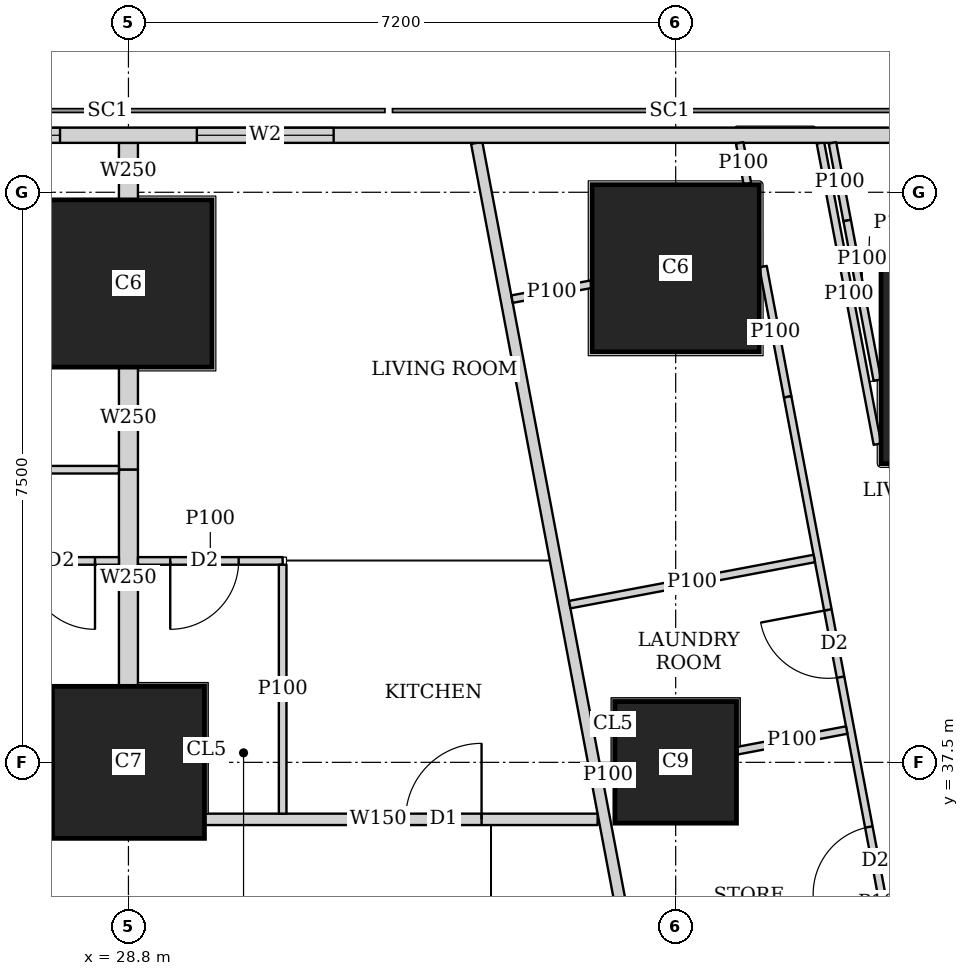
"""IFC4 building model, lengths in metres.
Left out: names, types, materials, properties, quantities, classifications, styles, units other than length and angle.
Written with IfcOpenShell. Run it as: python <this file> out.ifc"""

import sys

from ifc_helpers import new_model, si_unit, direction, frame, frame_2d, origin, origin_2d, place, context, subcontext, project, spatial, rectangle, extrude, element, fill, save


model = new_model("IFC4")
c1 = context("Model", 3, precision=1e-05, world=origin(), true_north=direction((0.0, 1.0)))
c2 = subcontext(c1, "Body", "Model", "MODEL_VIEW")
j1 = project(units=[si_unit("LENGTHUNIT", "METRE"), si_unit("PLANEANGLEUNIT", "RADIAN")], contexts=[c1])
p1 = place(None, origin())
s1 = spatial("IfcSite", under=j1, at=p1, CompositionType="ELEMENT")
p2 = place(p1, origin())
s2 = spatial("IfcBuilding", under=s1, at=p2, CompositionType="ELEMENT")
p3 = place(p2, frame((0.0, 0.0, 77.9)))
s3 = spatial("IfcBuildingStorey", under=s2, at=p3, CompositionType="ELEMENT", Elevation=77.9)
p4 = place(p3, frame((28.8, 37.5, 0.0), z_axis=(0.0, 0.0, 1.0), x_axis=(1.0, 0.0, 0.0)))
e1 = element("IfcColumn", 1, at=p4, inside=s3, PredefinedType="COLUMN", context=c2, shape_type="SweptSolid", body=[
    extrude(rectangle(XDim=2.0, YDim=2.0, at=origin_2d()), origin(), (0.0, 0.0, 1.0), 3.75),
])
p5 = place(p3, frame((36.0, 37.5, 0.0), z_axis=(0.0, 0.0, 1.0), x_axis=(1.0, 0.0, 0.0)))
e2 = element("IfcColumn", 2, at=p5, inside=s3, PredefinedType="COLUMN", context=c2, shape_type="SweptSolid", body=[
    extrude(rectangle(XDim=1.6, YDim=1.6, at=origin_2d()), origin(), (0.0, 0.0, 1.0), 3.75),
])
p6 = place(p3, frame((40.102, 42.83, 0.0), z_axis=(0.0, 0.0, 1.0), x_axis=(1.0, 0.0, 0.0)))
e3 = element("IfcColumn", 3, at=p6, inside=s3, PredefinedType="COLUMN", context=c2, shape_type="SweptSolid", body=[
    extrude(rectangle(XDim=2.8, YDim=2.8, at=origin_2d()), origin(), (0.0, 0.0, 1.0), 3.75),
])
for number, where, z_axis, x_axis in (
    (4, (28.8, 43.8, 0.0), (0.0, 0.0, 1.0), (1.0, 0.0, 0.0)),
    (5, (36.0, 44.0, 0.0), (0.0, 0.0, 1.0), (1.0, 0.0, 0.0)),
):
    element("IfcColumn", number, at=place(p3, frame(where, z_axis=z_axis, x_axis=x_axis)), inside=s3, PredefinedType="COLUMN", context=c2, shape_type="SweptSolid", body=[
        extrude(rectangle(XDim=2.2, YDim=2.2, at=origin_2d()), origin(), (0.0, 0.0, 1.0), 3.75),
    ])
p7 = place(p3, frame((40.106, 45.75, 0.0), z_axis=(0.0, 0.0, 1.0), x_axis=(-1.0, 0.0, 0.0)))
e6 = element("IfcWall", 6, at=p7, inside=s3, PredefinedType="SOLIDWALL", context=c2, shape_type="SweptSolid", body=[
    extrude(rectangle(XDim=37.943, YDim=0.2, at=frame_2d((18.971, 0.0))), origin(), (0.0, 0.0, 1.0), 3.5),
])
p8 = place(p7, frame((8.606, 0.0, 0.9)))
e7 = element("IfcOpeningElement", 7, at=p8, cuts=e6, PredefinedType="OPENING", context=c2, shape_type="SweptSolid", body=[
    extrude(rectangle(XDim=1.8, YDim=1.5, at=frame_2d((0.9, 0.75))), frame((0.0, 0.11, 0.0), z_axis=(0.0, -1.0, 0.0), x_axis=(1.0, 0.0, 0.0)), (0.0, 0.0, 1.0), 0.22),
])
p9 = place(p7, frame((12.206, 0.0, 0.9)))
e8 = element("IfcOpeningElement", 8, at=p9, cuts=e6, PredefinedType="OPENING", context=c2, shape_type="SweptSolid", body=[
    extrude(rectangle(XDim=1.8, YDim=1.5, at=frame_2d((0.9, 0.75))), frame((0.0, 0.11, 0.0), z_axis=(0.0, -1.0, 0.0), x_axis=(1.0, 0.0, 0.0)), (0.0, 0.0, 1.0), 0.22),
])
p10 = place(p7, frame((15.806, 0.0, 0.9)))
e9 = element("IfcOpeningElement", 9, at=p10, cuts=e6, PredefinedType="OPENING", context=c2, shape_type="SweptSolid", body=[
    extrude(rectangle(XDim=1.8, YDim=1.5, at=frame_2d((0.9, 0.75))), frame((0.0, 0.11, 0.0), z_axis=(0.0, -1.0, 0.0), x_axis=(1.0, 0.0, 0.0)), (0.0, 0.0, 1.0), 0.22),
])
p11 = place(p7, frame((19.406, 0.0, 0.9)))
e10 = element("IfcOpeningElement", 10, at=p11, cuts=e6, PredefinedType="OPENING", context=c2, shape_type="SweptSolid", body=[
    extrude(rectangle(XDim=1.8, YDim=1.5, at=frame_2d((0.9, 0.75))), frame((0.0, 0.11, 0.0), z_axis=(0.0, -1.0, 0.0), x_axis=(1.0, 0.0, 0.0)), (0.0, 0.0, 1.0), 0.22),
])
p12 = place(p7, frame((23.006, 0.0, 0.9)))
e11 = element("IfcOpeningElement", 11, at=p12, cuts=e6, PredefinedType="OPENING", context=c2, shape_type="SweptSolid", body=[
    extrude(rectangle(XDim=1.8, YDim=1.5, at=frame_2d((0.9, 0.75))), frame((0.0, 0.11, 0.0), z_axis=(0.0, -1.0, 0.0), x_axis=(1.0, 0.0, 0.0)), (0.0, 0.0, 1.0), 0.22),
])
p13 = place(p7, frame((26.606, 0.0, 0.9)))
e12 = element("IfcOpeningElement", 12, at=p13, cuts=e6, PredefinedType="OPENING", context=c2, shape_type="SweptSolid", body=[
    extrude(rectangle(XDim=1.8, YDim=1.5, at=frame_2d((0.9, 0.75))), frame((0.0, 0.11, 0.0), z_axis=(0.0, -1.0, 0.0), x_axis=(1.0, 0.0, 0.0)), (0.0, 0.0, 1.0), 0.22),
])
p14 = place(p3, frame((29.801, 36.75, 0.0), z_axis=(0.0, 0.0, 1.0), x_axis=(1.0, 0.0, 0.0)))
e13 = element("IfcWall", 13, at=p14, inside=s3, PredefinedType="SOLIDWALL", context=c2, shape_type="SweptSolid", body=[
    extrude(rectangle(XDim=5.172, YDim=0.15, at=frame_2d((2.586, 0.0))), origin(), (0.0, 0.0, 1.0), 3.5),
])
p15 = place(p14, frame((2.645, 0.0, 0.0)))
e14 = element("IfcOpeningElement", 14, at=p15, cuts=e13, PredefinedType="OPENING", context=c2, shape_type="SweptSolid", body=[
    extrude(rectangle(XDim=1.0, YDim=2.1, at=frame_2d((0.5, 1.05))), frame((0.0, 0.085, 0.0), z_axis=(0.0, -1.0, 0.0), x_axis=(1.0, 0.0, 0.0)), (0.0, 0.0, 1.0), 0.17),
])
p16 = place(p3, frame((33.382, 45.65, 0.0), z_axis=(0.0, 0.0, 1.0), x_axis=(0.185593544777, -0.982626600565, 0.0)))
e15 = element("IfcWall", 15, at=p16, inside=s3, PredefinedType="SOLIDWALL", context=c2, shape_type="SweptSolid", body=[
    extrude(rectangle(XDim=47.118, YDim=0.15, at=frame_2d((23.559, 0.0))), origin(), (0.0, 0.0, 1.0), 2.2),
])
p17 = place(p16, frame((19.054, 0.0, 0.0)))
e16 = element("IfcOpeningElement", 16, at=p17, cuts=e15, PredefinedType="OPENING", context=c2, shape_type="SweptSolid", body=[
    extrude(rectangle(XDim=1.0, YDim=2.1, at=frame_2d((0.5, 1.05))), frame((0.0, 0.085, 0.0), z_axis=(0.0, -1.0, 0.0), x_axis=(1.0, 0.0, 0.0)), (0.0, 0.0, 1.0), 0.17),
])
p18 = place(p16, frame((22.87, 0.0, 0.0)))
e17 = element("IfcOpeningElement", 17, at=p18, cuts=e15, PredefinedType="OPENING", context=c2, shape_type="SweptSolid", body=[
    extrude(rectangle(XDim=1.0, YDim=2.1, at=frame_2d((0.5, 1.05))), frame((0.0, 0.085, 0.0), z_axis=(0.0, -1.0, 0.0), x_axis=(1.0, 0.0, 0.0)), (0.0, 0.0, 1.0), 0.17),
])
p19 = place(p16, frame((33.833, 0.0, 0.0)))
e18 = element("IfcOpeningElement", 18, at=p19, cuts=e15, PredefinedType="OPENING", context=c2, shape_type="SweptSolid", body=[
    extrude(rectangle(XDim=1.0, YDim=2.1, at=frame_2d((0.5, 1.05))), frame((0.0, 0.085, 0.0), z_axis=(0.0, -1.0, 0.0), x_axis=(1.0, 0.0, 0.0)), (0.0, 0.0, 1.0), 0.17),
])
p20 = place(p3, frame((38.654, 41.686, 0.0), z_axis=(0.0, 0.0, 1.0), x_axis=(-0.185676896978, 0.982610853761, 0.0)))
e19 = element("IfcWall", 19, at=p20, inside=s3, PredefinedType="PARTITIONING", context=c2, shape_type="SweptSolid", body=[
    extrude(rectangle(XDim=4.034, YDim=0.1, at=frame_2d((2.017, 0.0))), origin(), (0.0, 0.0, 1.0), 2.05),
])
p21 = place(p3, frame((38.063, 45.65, 0.0), z_axis=(0.0, 0.0, 1.0), x_axis=(0.185677287841, -0.982610779902, 0.0)))
e20 = element("IfcWall", 20, at=p21, inside=s3, PredefinedType="PARTITIONING", context=c2, shape_type="SweptSolid", body=[
    extrude(rectangle(XDim=1.04, YDim=0.1, at=frame_2d((0.52, 0.0))), origin(), (0.0, 0.0, 1.0), 3.5),
])
p22 = place(p3, frame((38.256, 44.628, 0.0), z_axis=(0.0, 0.0, 1.0), x_axis=(0.185757524649, -0.982595614704, 0.0)))
e21 = element("IfcWall", 21, at=p22, inside=s3, PredefinedType="PARTITIONING", context=c2, shape_type="SweptSolid", body=[
    extrude(rectangle(XDim=2.137, YDim=0.1, at=frame_2d((1.068, 0.0))), origin(), (0.0, 0.0, 1.0), 2.05),
])
p23 = place(p3, frame((38.862, 41.42, 0.0), z_axis=(0.0, 0.0, 1.0), x_axis=(0.185529020159, -0.982638785454, 0.0)))
e22 = element("IfcWall", 22, at=p23, inside=s3, PredefinedType="PARTITIONING", context=c2, shape_type="SweptSolid", body=[
    extrude(rectangle(XDim=12.262, YDim=0.1, at=frame_2d((6.131, 0.0))), origin(), (0.0, 0.0, 1.0), 2.5),
])
p24 = place(p23, frame((11.212, 0.0, 0.0)))
e23 = element("IfcOpeningElement", 23, at=p24, cuts=e22, PredefinedType="OPENING", context=c2, shape_type="SweptSolid", body=[
    extrude(rectangle(XDim=0.9, YDim=2.1, at=frame_2d((0.45, 1.05))), frame((0.0, 0.06, 0.0), z_axis=(0.0, -1.0, 0.0), x_axis=(1.0, 0.0, 0.0)), (0.0, 0.0, 1.0), 0.12),
])
p25 = place(p23, frame((7.555, 0.0, 0.0)))
e24 = element("IfcOpeningElement", 24, at=p25, cuts=e22, PredefinedType="OPENING", context=c2, shape_type="SweptSolid", body=[
    extrude(rectangle(XDim=0.9, YDim=2.1, at=frame_2d((0.45, 1.05))), frame((0.0, 0.06, 0.0), z_axis=(0.0, -1.0, 0.0), x_axis=(1.0, 0.0, 0.0)), (0.0, 0.0, 1.0), 0.12),
])
p26 = place(p23, frame((3.579, 0.0, 0.0)))
e25 = element("IfcOpeningElement", 25, at=p26, cuts=e22, PredefinedType="OPENING", context=c2, shape_type="SweptSolid", body=[
    extrude(rectangle(XDim=0.9, YDim=2.1, at=frame_2d((0.45, 1.05))), frame((0.0, 0.06, 0.0), z_axis=(0.0, -1.0, 0.0), x_axis=(1.0, 0.0, 0.0)), (0.0, 0.0, 1.0), 0.12),
])
p27 = place(p3, frame((36.842, 45.65, 0.0), z_axis=(0.0, 0.0, 1.0), x_axis=(0.185764109712, -0.98259436979, 0.0)))
e26 = element("IfcWall", 26, at=p27, inside=s3, PredefinedType="PARTITIONING", context=c2, shape_type="SweptSolid", body=[
    extrude(rectangle(XDim=0.549, YDim=0.1, at=frame_2d((0.275, 0.0))), origin(), (0.0, 0.0, 1.0), 3.5),
])
p28 = place(p3, frame((37.149, 44.022, 0.0), z_axis=(0.0, 0.0, 1.0), x_axis=(0.185844162065, -0.982579232137, 0.0)))
e27 = element("IfcWall", 27, at=p28, inside=s3, PredefinedType="PARTITIONING", context=c2, shape_type="SweptSolid", body=[
    extrude(rectangle(XDim=1.743, YDim=0.1, at=frame_2d((0.872, 0.0))), origin(), (0.0, 0.0, 1.0), 2.05),
])
p29 = place(p3, frame((37.473, 42.309, 0.0), z_axis=(0.0, 0.0, 1.0), x_axis=(0.185570636839, -0.982630927024, 0.0)))
e28 = element("IfcWall", 28, at=p29, inside=s3, PredefinedType="PARTITIONING", context=c2, shape_type="SweptSolid", body=[
    extrude(rectangle(XDim=13.553, YDim=0.1, at=frame_2d((6.777, 0.0))), origin(), (0.0, 0.0, 1.0), 2.5),
])
p30 = place(p29, frame((12.049, 0.0, 0.0)))
e29 = element("IfcOpeningElement", 29, at=p30, cuts=e28, PredefinedType="OPENING", context=c2, shape_type="SweptSolid", body=[
    extrude(rectangle(XDim=0.9, YDim=2.1, at=frame_2d((0.45, 1.05))), frame((0.0, 0.06, 0.0), z_axis=(0.0, -1.0, 0.0), x_axis=(1.0, 0.0, 0.0)), (0.0, 0.0, 1.0), 0.12),
])
p31 = place(p29, frame((8.427, 0.0, 0.0)))
e30 = element("IfcOpeningElement", 30, at=p31, cuts=e28, PredefinedType="OPENING", context=c2, shape_type="SweptSolid", body=[
    extrude(rectangle(XDim=0.9, YDim=2.1, at=frame_2d((0.45, 1.05))), frame((0.0, 0.06, 0.0), z_axis=(0.0, -1.0, 0.0), x_axis=(1.0, 0.0, 0.0)), (0.0, 0.0, 1.0), 0.12),
])
p32 = place(p29, frame((2.853, 0.0, 0.0)))
e31 = element("IfcOpeningElement", 31, at=p32, cuts=e28, PredefinedType="OPENING", context=c2, shape_type="SweptSolid", body=[
    extrude(rectangle(XDim=0.9, YDim=2.1, at=frame_2d((0.45, 1.05))), frame((0.0, 0.06, 0.0), z_axis=(0.0, -1.0, 0.0), x_axis=(1.0, 0.0, 0.0)), (0.0, 0.0, 1.0), 0.12),
])
p33 = place(p29, frame((10.14, 0.0, 0.0)))
e32 = element("IfcOpeningElement", 32, at=p33, cuts=e28, PredefinedType="OPENING", context=c2, shape_type="SweptSolid", body=[
    extrude(rectangle(XDim=0.9, YDim=2.1, at=frame_2d((0.45, 1.05))), frame((0.0, 0.06, 0.0), z_axis=(0.0, -1.0, 0.0), x_axis=(1.0, 0.0, 0.0)), (0.0, 0.0, 1.0), 0.12),
])
p34 = place(p29, frame((5.759, 0.0, 0.0)))
e33 = element("IfcOpeningElement", 33, at=p34, cuts=e28, PredefinedType="OPENING", context=c2, shape_type="SweptSolid", body=[
    extrude(rectangle(XDim=0.9, YDim=2.1, at=frame_2d((0.45, 1.05))), frame((0.0, 0.06, 0.0), z_axis=(0.0, -1.0, 0.0), x_axis=(1.0, 0.0, 0.0)), (0.0, 0.0, 1.0), 0.12),
])
p35 = place(p3, frame((38.692, 44.23, 0.0), z_axis=(0.0, 0.0, 1.0), x_axis=(-0.982944840311, -0.183900627803, 0.0)))
e34 = element("IfcWall", 34, at=p35, inside=s3, PredefinedType="PARTITIONING", context=c2, shape_type="SweptSolid", body=[
    extrude(rectangle(XDim=0.304, YDim=0.1, at=frame_2d((0.152, 0.0))), origin(), (0.0, 0.0, 1.0), 2.05),
])
p36 = place(p3, frame((34.89, 43.791, 0.0), z_axis=(0.0, 0.0, 1.0), x_axis=(-0.982621304855, -0.185621580763, 0.0)))
e35 = element("IfcWall", 35, at=p36, inside=s3, PredefinedType="PARTITIONING", context=c2, shape_type="SweptSolid", body=[
    extrude(rectangle(XDim=1.062, YDim=0.1, at=frame_2d((0.531, 0.0))), origin(), (0.0, 0.0, 1.0), 2.05),
])
p37 = place(p3, frame((37.824, 40.182, 0.0), z_axis=(0.0, 0.0, 1.0), x_axis=(-0.982674977865, -0.185337227447, 0.0)))
e36 = element("IfcWall", 36, at=p37, inside=s3, PredefinedType="PARTITIONING", context=c2, shape_type="SweptSolid", body=[
    extrude(rectangle(XDim=3.275, YDim=0.1, at=frame_2d((1.637, 0.0))), origin(), (0.0, 0.0, 1.0), 3.5),
])
p38 = place(p3, frame((38.25, 37.925, 0.0), z_axis=(0.0, 0.0, 1.0), x_axis=(-0.982626127294, -0.185596050493, 0.0)))
e37 = element("IfcWall", 37, at=p38, inside=s3, PredefinedType="PARTITIONING", context=c2, shape_type="SweptSolid", body=[
    extrude(rectangle(XDim=1.465, YDim=0.1, at=frame_2d((0.733, 0.0))), origin(), (0.0, 0.0, 1.0), 3.5),
])
p39 = place(p3, frame((35.19, 37.347, 0.0), z_axis=(0.0, 0.0, 1.0), x_axis=(-0.982404955251, -0.186763229514, 0.0)))
e38 = element("IfcWall", 38, at=p39, inside=s3, PredefinedType="PARTITIONING", context=c2, shape_type="SweptSolid", body=[
    extrude(rectangle(XDim=0.161, YDim=0.1, at=frame_2d((0.081, 0.0))), origin(), (0.0, 0.0, 1.0), 3.5),
])
p40 = place(p3, frame((18.0, 41.35, 0.0), z_axis=(0.0, 0.0, 1.0), x_axis=(1.0, 0.0, 0.0)))
e39 = element("IfcWall", 39, at=p40, inside=s3, PredefinedType="PARTITIONING", context=c2, shape_type="SweptSolid", body=[
    extrude(rectangle(XDim=10.675, YDim=0.1, at=frame_2d((5.337, 0.0))), origin(), (0.0, 0.0, 1.0), 3.5),
])
p41 = place(p40, frame((0.2, 0.0, 0.0)))
e40 = element("IfcOpeningElement", 40, at=p41, cuts=e39, PredefinedType="OPENING", context=c2, shape_type="SweptSolid", body=[
    extrude(rectangle(XDim=0.9, YDim=2.1, at=frame_2d((0.45, 1.05))), frame((0.0, 0.06, 0.0), z_axis=(0.0, -1.0, 0.0), x_axis=(1.0, 0.0, 0.0)), (0.0, 0.0, 1.0), 0.12),
])
p42 = place(p40, frame((3.8, 0.0, 0.0)))
e41 = element("IfcOpeningElement", 41, at=p42, cuts=e39, PredefinedType="OPENING", context=c2, shape_type="SweptSolid", body=[
    extrude(rectangle(XDim=0.9, YDim=2.1, at=frame_2d((0.45, 1.05))), frame((0.0, 0.06, 0.0), z_axis=(0.0, -1.0, 0.0), x_axis=(1.0, 0.0, 0.0)), (0.0, 0.0, 1.0), 0.12),
])
p43 = place(p40, frame((7.4, 0.0, 0.0)))
e42 = element("IfcOpeningElement", 42, at=p43, cuts=e39, PredefinedType="OPENING", context=c2, shape_type="SweptSolid", body=[
    extrude(rectangle(XDim=0.9, YDim=2.1, at=frame_2d((0.45, 1.05))), frame((0.0, 0.06, 0.0), z_axis=(0.0, -1.0, 0.0), x_axis=(1.0, 0.0, 0.0)), (0.0, 0.0, 1.0), 0.12),
])
p44 = place(p3, frame((18.0, 40.15, 0.0), z_axis=(0.0, 0.0, 1.0), x_axis=(1.0, 0.0, 0.0)))
e43 = element("IfcWall", 43, at=p44, inside=s3, PredefinedType="PARTITIONING", context=c2, shape_type="SweptSolid", body=[
    extrude(rectangle(XDim=10.675, YDim=0.1, at=frame_2d((5.337, 0.0))), origin(), (0.0, 0.0, 1.0), 3.5),
])
p45 = place(p44, frame((0.655, 0.0, 0.0)))
e44 = element("IfcOpeningElement", 44, at=p45, cuts=e43, PredefinedType="OPENING", context=c2, shape_type="SweptSolid", body=[
    extrude(rectangle(XDim=0.9, YDim=2.1, at=frame_2d((0.45, 1.05))), frame((0.0, 0.06, 0.0), z_axis=(0.0, -1.0, 0.0), x_axis=(1.0, 0.0, 0.0)), (0.0, 0.0, 1.0), 0.12),
])
p46 = place(p44, frame((3.95, 0.0, 0.0)))
e45 = element("IfcOpeningElement", 45, at=p46, cuts=e43, PredefinedType="OPENING", context=c2, shape_type="SweptSolid", body=[
    extrude(rectangle(XDim=0.9, YDim=2.1, at=frame_2d((0.45, 1.05))), frame((0.0, 0.06, 0.0), z_axis=(0.0, -1.0, 0.0), x_axis=(1.0, 0.0, 0.0)), (0.0, 0.0, 1.0), 0.12),
])
p47 = place(p44, frame((7.66, 0.0, 0.0)))
e46 = element("IfcOpeningElement", 46, at=p47, cuts=e43, PredefinedType="OPENING", context=c2, shape_type="SweptSolid", body=[
    extrude(rectangle(XDim=0.9, YDim=2.1, at=frame_2d((0.45, 1.05))), frame((0.0, 0.06, 0.0), z_axis=(0.0, -1.0, 0.0), x_axis=(1.0, 0.0, 0.0)), (0.0, 0.0, 1.0), 0.12),
])
p48 = place(p44, frame((2.455, 0.0, 0.0)))
e47 = element("IfcOpeningElement", 47, at=p48, cuts=e43, PredefinedType="OPENING", context=c2, shape_type="SweptSolid", body=[
    extrude(rectangle(XDim=0.9, YDim=2.1, at=frame_2d((0.45, 1.05))), frame((0.0, 0.06, 0.0), z_axis=(0.0, -1.0, 0.0), x_axis=(1.0, 0.0, 0.0)), (0.0, 0.0, 1.0), 0.12),
])
p49 = place(p44, frame((5.75, 0.0, 0.0)))
e48 = element("IfcOpeningElement", 48, at=p49, cuts=e43, PredefinedType="OPENING", context=c2, shape_type="SweptSolid", body=[
    extrude(rectangle(XDim=0.9, YDim=2.1, at=frame_2d((0.45, 1.05))), frame((0.0, 0.06, 0.0), z_axis=(0.0, -1.0, 0.0), x_axis=(1.0, 0.0, 0.0)), (0.0, 0.0, 1.0), 0.12),
])
p50 = place(p44, frame((9.46, 0.0, 0.0)))
e49 = element("IfcOpeningElement", 49, at=p50, cuts=e43, PredefinedType="OPENING", context=c2, shape_type="SweptSolid", body=[
    extrude(rectangle(XDim=0.9, YDim=2.1, at=frame_2d((0.45, 1.05))), frame((0.0, 0.06, 0.0), z_axis=(0.0, -1.0, 0.0), x_axis=(1.0, 0.0, 0.0)), (0.0, 0.0, 1.0), 0.12),
])
p51 = place(p3, frame((28.925, 40.15, 0.0), z_axis=(0.0, 0.0, 1.0), x_axis=(1.0, 0.0, 0.0)))
e50 = element("IfcWall", 50, at=p51, inside=s3, PredefinedType="PARTITIONING", context=c2, shape_type="SweptSolid", body=[
    extrude(rectangle(XDim=1.904, YDim=0.1, at=frame_2d((0.952, 0.0))), origin(), (0.0, 0.0, 1.0), 3.5),
])
p52 = place(p51, frame((0.425, 0.0, 0.0)))
e51 = element("IfcOpeningElement", 51, at=p52, cuts=e50, PredefinedType="OPENING", context=c2, shape_type="SweptSolid", body=[
    extrude(rectangle(XDim=0.9, YDim=2.1, at=frame_2d((0.45, 1.05))), frame((0.0, 0.06, 0.0), z_axis=(0.0, -1.0, 0.0), x_axis=(1.0, 0.0, 0.0)), (0.0, 0.0, 1.0), 0.12),
])
p53 = place(p3, frame((30.829, 36.825, 0.0), z_axis=(0.0, 0.0, 1.0), x_axis=(0.0, 1.0, 0.0)))
e52 = element("IfcWall", 52, at=p53, inside=s3, PredefinedType="PARTITIONING", context=c2, shape_type="SweptSolid", body=[
    extrude(rectangle(XDim=3.275, YDim=0.1, at=frame_2d((1.638, 0.0))), origin(), (0.0, 0.0, 1.0), 3.5),
])
p54 = place(p3, frame((28.8, 41.35, 0.0), z_axis=(0.0, 0.0, 1.0), x_axis=(0.0, 1.0, 0.0)))
e53 = element("IfcWall", 53, at=p54, inside=s3, PredefinedType="SOLIDWALL", context=c2, shape_type="SweptSolid", body=[
    extrude(rectangle(XDim=1.349, YDim=0.25, at=frame_2d((0.674, 0.0))), origin(), (0.0, 0.0, 1.0), 3.5),
])
p55 = place(p3, frame((28.8, 44.901, 0.0), z_axis=(0.0, 0.0, 1.0), x_axis=(0.0, 1.0, 0.0)))
e54 = element("IfcWall", 54, at=p55, inside=s3, PredefinedType="SOLIDWALL", context=c2, shape_type="SweptSolid", body=[
    extrude(rectangle(XDim=0.749, YDim=0.25, at=frame_2d((0.375, 0.0))), origin(), (0.0, 0.0, 1.0), 3.5),
])
p56 = place(p3, frame((28.8, 38.501, 0.0), z_axis=(0.0, 0.0, 1.0), x_axis=(0.0, 1.0, 0.0)))
e55 = element("IfcWall", 55, at=p56, inside=s3, PredefinedType="SOLIDWALL", context=c2, shape_type="SweptSolid", body=[
    extrude(rectangle(XDim=2.849, YDim=0.25, at=frame_2d((1.425, 0.0))), origin(), (0.0, 0.0, 1.0), 3.5),
])
p57 = place(p8, origin())
e56 = element("IfcWindow", 56, at=p57, inside=s3, PartitioningType="SINGLE_PANEL", PredefinedType="WINDOW", context=c2, shape_type="SweptSolid", body=[
    extrude(rectangle(XDim=1.8, YDim=1.5, at=frame_2d((0.9, 0.75))), frame((0.0, 0.03, 0.0), z_axis=(0.0, -1.0, 0.0), x_axis=(1.0, 0.0, 0.0)), (0.0, 0.0, 1.0), 0.06),
])
fill(e7, e56)
p58 = place(p9, origin())
e57 = element("IfcWindow", 57, at=p58, inside=s3, PartitioningType="SINGLE_PANEL", PredefinedType="WINDOW", context=c2, shape_type="SweptSolid", body=[
    extrude(rectangle(XDim=1.8, YDim=1.5, at=frame_2d((0.9, 0.75))), frame((0.0, 0.03, 0.0), z_axis=(0.0, -1.0, 0.0), x_axis=(1.0, 0.0, 0.0)), (0.0, 0.0, 1.0), 0.06),
])
fill(e8, e57)
p59 = place(p32, origin())
e58 = element("IfcDoor", 58, at=p59, inside=s3, OperationType="SINGLE_SWING_RIGHT", PredefinedType="DOOR", context=c2, shape_type="SweptSolid", body=[
    extrude(rectangle(XDim=0.9, YDim=2.1, at=frame_2d((0.45, 1.05))), frame((0.0, 0.025, 0.0), z_axis=(0.0, -1.0, 0.0), x_axis=(1.0, 0.0, 0.0)), (0.0, 0.0, 1.0), 0.05),
])
fill(e31, e58)
p60 = place(p34, origin())
e59 = element("IfcDoor", 59, at=p60, inside=s3, OperationType="SINGLE_SWING_LEFT", PredefinedType="DOOR", context=c2, shape_type="SweptSolid", body=[
    extrude(rectangle(XDim=0.9, YDim=2.1, at=frame_2d((0.45, 1.05))), frame((0.0, 0.025, 0.0), z_axis=(0.0, -1.0, 0.0), x_axis=(1.0, 0.0, 0.0)), (0.0, 0.0, 1.0), 0.05),
])
fill(e33, e59)
p61 = place(p50, origin())
e60 = element("IfcDoor", 60, at=p61, inside=s3, OperationType="SINGLE_SWING_LEFT", PredefinedType="DOOR", context=c2, shape_type="SweptSolid", body=[
    extrude(rectangle(XDim=0.9, YDim=2.1, at=frame_2d((0.45, 1.05))), frame((0.0, 0.025, 0.0), z_axis=(0.0, -1.0, 0.0), x_axis=(1.0, 0.0, 0.0)), (0.0, 0.0, 1.0), 0.05),
])
fill(e49, e60)
p62 = place(p52, origin())
e61 = element("IfcDoor", 61, at=p62, inside=s3, OperationType="SINGLE_SWING_RIGHT", PredefinedType="DOOR", context=c2, shape_type="SweptSolid", body=[
    extrude(rectangle(XDim=0.9, YDim=2.1, at=frame_2d((0.45, 1.05))), frame((0.0, 0.025, 0.0), z_axis=(0.0, -1.0, 0.0), x_axis=(1.0, 0.0, 0.0)), (0.0, 0.0, 1.0), 0.05),
])
fill(e51, e61)
p63 = place(p15, origin())
e62 = element("IfcDoor", 62, at=p63, inside=s3, OperationType="SINGLE_SWING_RIGHT", PredefinedType="DOOR", context=c2, shape_type="SweptSolid", body=[
    extrude(rectangle(XDim=1.0, YDim=2.1, at=frame_2d((0.5, 1.05))), frame((0.0, 0.025, 0.0), z_axis=(0.0, -1.0, 0.0), x_axis=(1.0, 0.0, 0.0)), (0.0, 0.0, 1.0), 0.05),
])
fill(e14, e62)
save(model, sys.argv[1])
